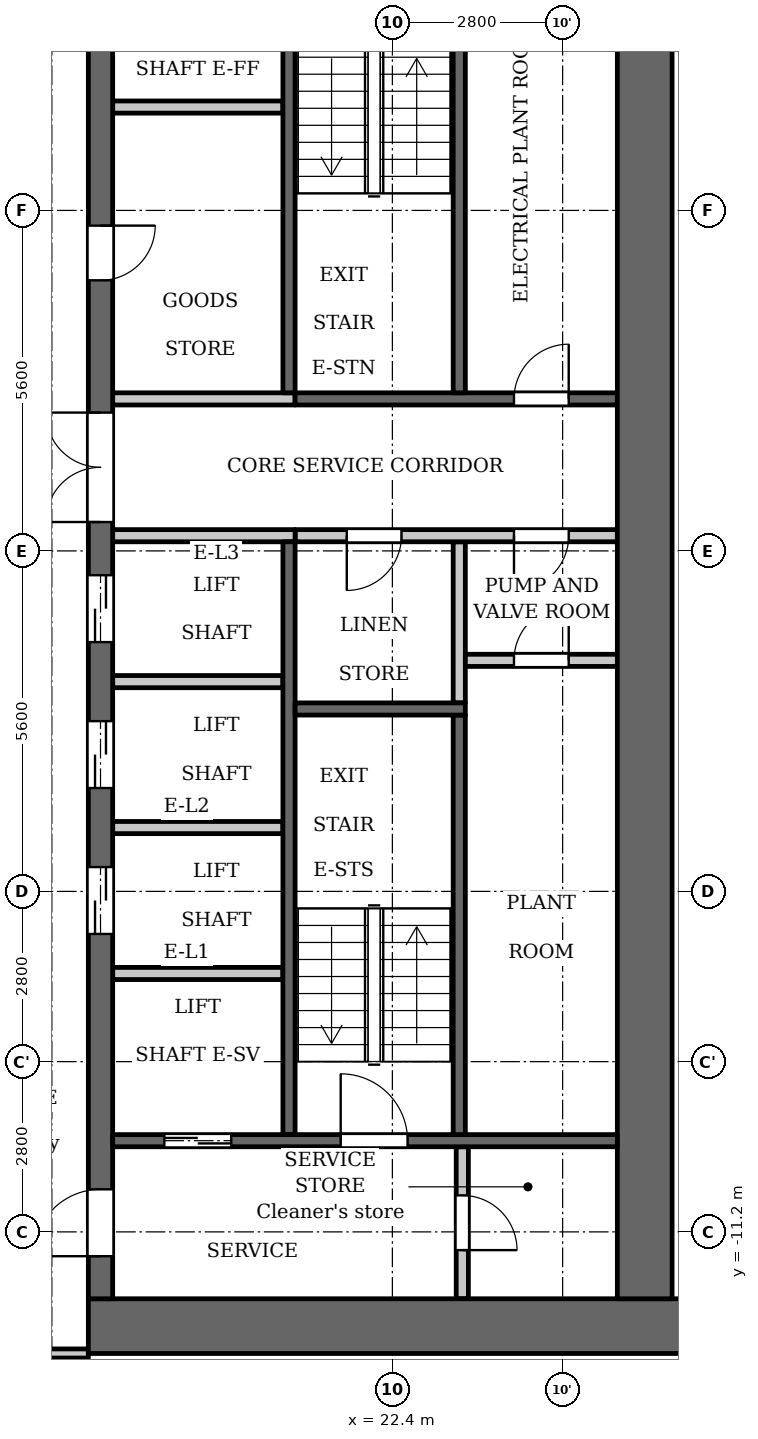
"""IFC4 building model, lengths in metres.
Left out: names, types, materials, properties, quantities, classifications, styles, units other than length and angle.
Written with IfcOpenShell. Run it as: python <this file> out.ifc"""

import sys

from ifc_helpers import new_model, si_unit, direction, frame, frame_2d, origin, place, context, subcontext, project, spatial, rectangle, extrude, element, fill, save


model = new_model("IFC4")
c1 = context("Model", 3, precision=1e-05, world=origin(), true_north=direction((0.0, 1.0)))
c2 = subcontext(c1, "Body", "Model", "MODEL_VIEW")
j1 = project(units=[si_unit("LENGTHUNIT", "METRE"), si_unit("PLANEANGLEUNIT", "RADIAN")], contexts=[c1])
p1 = place(None, origin())
s1 = spatial("IfcSite", under=j1, at=p1, CompositionType="ELEMENT")
p2 = place(p1, origin())
s2 = spatial("IfcBuilding", under=s1, at=p2, CompositionType="ELEMENT")
p3 = place(p2, frame((0.0, 0.0, 37.5)))
s3 = spatial("IfcBuildingStorey", under=s2, at=p3, CompositionType="ELEMENT", Elevation=37.5)
p4 = place(p3, frame((23.5, -2.5, 0.0), z_axis=(0.0, 0.0, 1.0), x_axis=(0.0, 1.0, 0.0)))
e1 = element("IfcWall", 1, at=p4, inside=s3, PredefinedType="PARTITIONING", context=c2, shape_type="SweptSolid", body=[
    extrude(rectangle(XDim=2.65, YDim=0.2, at=frame_2d((1.325, 0.0))), origin(), (0.0, 0.0, 1.0), 3.2),
])
p5 = place(p3, frame((20.7, 2.6, 0.0), z_axis=(0.0, 0.0, 1.0), x_axis=(0.0, 1.0, 0.0)))
e2 = element("IfcWall", 2, at=p5, inside=s3, PredefinedType="SHEAR", context=c2, shape_type="SweptSolid", body=[
    extrude(rectangle(XDim=7.0, YDim=0.2, at=frame_2d((3.5, 0.0))), origin(), (0.0, 0.0, 1.0), 3.2),
])
p6 = place(p3, frame((20.7, -9.6, 0.0), z_axis=(0.0, 0.0, 1.0), x_axis=(0.0, 1.0, 0.0)))
e3 = element("IfcWall", 3, at=p6, inside=s3, PredefinedType="SHEAR", context=c2, shape_type="SweptSolid", body=[
    extrude(rectangle(XDim=9.75, YDim=0.2, at=frame_2d((4.875, 0.0))), origin(), (0.0, 0.0, 1.0), 3.2),
])
p7 = place(p3, frame((20.8, 2.5, 0.0), z_axis=(0.0, 0.0, 1.0), x_axis=(1.0, 0.0, 0.0)))
e4 = element("IfcWall", 4, at=p7, inside=s3, PredefinedType="SHEAR", context=c2, shape_type="SweptSolid", body=[
    extrude(rectangle(XDim=5.3, YDim=0.2, at=frame_2d((2.65, 0.0))), origin(), (0.0, 0.0, 1.0), 3.2),
])
p8 = place(p7, frame((3.6, 0.0, 0.0)))
e5 = element("IfcOpeningElement", 5, at=p8, cuts=e4, PredefinedType="OPENING", context=c2, shape_type="SweptSolid", body=[
    extrude(rectangle(XDim=0.9, YDim=2.1, at=frame_2d((0.45, 1.05))), frame((0.0, 0.11, 0.0), z_axis=(0.0, -1.0, 0.0), x_axis=(1.0, 0.0, 0.0)), (0.0, 0.0, 1.0), 0.22),
])
p9 = place(p3, frame((20.8, 0.25, 0.0), z_axis=(0.0, 0.0, 1.0), x_axis=(1.0, 0.0, 0.0)))
e6 = element("IfcWall", 6, at=p9, inside=s3, PredefinedType="PARTITIONING", context=c2, shape_type="SweptSolid", body=[
    extrude(rectangle(XDim=5.3, YDim=0.2, at=frame_2d((2.65, 0.0))), origin(), (0.0, 0.0, 1.0), 3.2),
])
p10 = place(p9, frame((0.85, 0.0, 0.0)))
e7 = element("IfcOpeningElement", 7, at=p10, cuts=e6, PredefinedType="OPENING", context=c2, shape_type="SweptSolid", body=[
    extrude(rectangle(XDim=0.9, YDim=2.1, at=frame_2d((0.45, 1.05))), frame((0.0, 0.11, 0.0), z_axis=(0.0, -1.0, 0.0), x_axis=(1.0, 0.0, 0.0)), (0.0, 0.0, 1.0), 0.22),
])
p11 = place(p9, frame((3.6, 0.0, 0.0)))
e8 = element("IfcOpeningElement", 8, at=p11, cuts=e6, PredefinedType="OPENING", context=c2, shape_type="SweptSolid", body=[
    extrude(rectangle(XDim=0.9, YDim=2.1, at=frame_2d((0.45, 1.05))), frame((0.0, 0.11, 0.0), z_axis=(0.0, -1.0, 0.0), x_axis=(1.0, 0.0, 0.0)), (0.0, 0.0, 1.0), 0.22),
])
p12 = place(p3, frame((17.4, -12.75, 0.0), z_axis=(0.0, 0.0, 1.0), x_axis=(1.0, 0.0, 0.0)))
e9 = element("IfcWall", 9, at=p12, inside=s3, PredefinedType="SHEAR", context=c2, shape_type="SweptSolid", body=[
    extrude(rectangle(XDim=10.4, YDim=0.9, at=frame_2d((5.2, 0.0))), origin(), (0.0, 0.0, 1.0), 3.2),
])
p13 = place(p3, frame((17.6, -12.3, 0.0), z_axis=(0.0, 0.0, 1.0), x_axis=(0.0, 1.0, 0.0)))
e10 = element("IfcWall", 10, at=p13, inside=s3, PredefinedType="SHEAR", context=c2, shape_type="SweptSolid", body=[
    extrude(rectangle(XDim=24.6, YDim=0.4, at=frame_2d((12.3, 0.0))), origin(), (0.0, 0.0, 1.0), 3.2),
])
p14 = place(p13, frame((6.0, 0.0, 0.0)))
e11 = element("IfcOpeningElement", 11, at=p14, cuts=e10, PredefinedType="OPENING", context=c2, shape_type="SweptSolid", body=[
    extrude(rectangle(XDim=1.1, YDim=2.1, at=frame_2d((0.55, 1.05))), frame((0.0, 0.21, 0.0), z_axis=(0.0, -1.0, 0.0), x_axis=(1.0, 0.0, 0.0)), (0.0, 0.0, 1.0), 0.42),
])
p15 = place(p13, frame((8.4, 0.0, 0.0)))
e12 = element("IfcOpeningElement", 12, at=p15, cuts=e10, PredefinedType="OPENING", context=c2, shape_type="SweptSolid", body=[
    extrude(rectangle(XDim=1.1, YDim=2.1, at=frame_2d((0.55, 1.05))), frame((0.0, 0.21, 0.0), z_axis=(0.0, -1.0, 0.0), x_axis=(1.0, 0.0, 0.0)), (0.0, 0.0, 1.0), 0.42),
])
p16 = place(p13, frame((10.8, 0.0, 0.0)))
e13 = element("IfcOpeningElement", 13, at=p16, cuts=e10, PredefinedType="OPENING", context=c2, shape_type="SweptSolid", body=[
    extrude(rectangle(XDim=1.1, YDim=2.1, at=frame_2d((0.55, 1.05))), frame((0.0, 0.21, 0.0), z_axis=(0.0, -1.0, 0.0), x_axis=(1.0, 0.0, 0.0)), (0.0, 0.0, 1.0), 0.42),
])
p17 = place(p13, frame((16.75, 0.0, 0.0)))
e14 = element("IfcOpeningElement", 14, at=p17, cuts=e10, PredefinedType="OPENING", context=c2, shape_type="SweptSolid", body=[
    extrude(rectangle(XDim=0.9, YDim=2.1, at=frame_2d((0.45, 1.05))), frame((0.0, 0.21, 0.0), z_axis=(0.0, -1.0, 0.0), x_axis=(1.0, 0.0, 0.0)), (0.0, 0.0, 1.0), 0.42),
])
p18 = place(p13, frame((22.8, 0.0, 0.0)))
e15 = element("IfcOpeningElement", 15, at=p18, cuts=e10, PredefinedType="OPENING", context=c2, shape_type="SweptSolid", body=[
    extrude(rectangle(XDim=1.1, YDim=2.1, at=frame_2d((0.55, 1.05))), frame((0.0, 0.21, 0.0), z_axis=(0.0, -1.0, 0.0), x_axis=(1.0, 0.0, 0.0)), (0.0, 0.0, 1.0), 0.42),
])
p19 = place(p13, frame((0.7, 0.0, 0.0)))
e16 = element("IfcOpeningElement", 16, at=p19, cuts=e10, PredefinedType="OPENING", context=c2, shape_type="SweptSolid", body=[
    extrude(rectangle(XDim=1.1, YDim=2.1, at=frame_2d((0.55, 1.05))), frame((0.0, 0.21, 0.0), z_axis=(0.0, -1.0, 0.0), x_axis=(1.0, 0.0, 0.0)), (0.0, 0.0, 1.0), 0.42),
])
p20 = place(p13, frame((12.775, 0.0, 0.0)))
e17 = element("IfcOpeningElement", 17, at=p20, cuts=e10, PredefinedType="OPENING", context=c2, shape_type="SweptSolid", body=[
    extrude(rectangle(XDim=1.8, YDim=2.1, at=frame_2d((0.9, 1.05))), frame((0.0, 0.21, 0.0), z_axis=(0.0, -1.0, 0.0), x_axis=(1.0, 0.0, 0.0)), (0.0, 0.0, 1.0), 0.42),
])
p21 = place(p3, frame((26.55, -12.3, 0.0), z_axis=(0.0, 0.0, 1.0), x_axis=(0.0, 1.0, 0.0)))
e18 = element("IfcWall", 18, at=p21, inside=s3, PredefinedType="SHEAR", context=c2, shape_type="SweptSolid", body=[
    extrude(rectangle(XDim=24.6, YDim=0.9, at=frame_2d((12.3, 0.0))), origin(), (0.0, 0.0, 1.0), 3.2),
])
p22 = place(p3, frame((23.55, -12.3, 0.0), z_axis=(0.0, 0.0, 1.0), x_axis=(0.0, 1.0, 0.0)))
e19 = element("IfcWall", 19, at=p22, inside=s3, PredefinedType="PARTITIONING", context=c2, shape_type="SweptSolid", body=[
    extrude(rectangle(XDim=2.5, YDim=0.2, at=frame_2d((1.25, 0.0))), origin(), (0.0, 0.0, 1.0), 3.2),
])
p23 = place(p22, frame((0.8, 0.0, 0.0)))
e20 = element("IfcOpeningElement", 20, at=p23, cuts=e19, PredefinedType="OPENING", context=c2, shape_type="SweptSolid", body=[
    extrude(rectangle(XDim=0.9, YDim=2.1, at=frame_2d((0.45, 1.05))), frame((0.0, 0.11, 0.0), z_axis=(0.0, -1.0, 0.0), x_axis=(1.0, 0.0, 0.0)), (0.0, 0.0, 1.0), 0.22),
])
p24 = place(p3, frame((23.6, -1.8, 0.0), z_axis=(0.0, 0.0, 1.0), x_axis=(1.0, 0.0, 0.0)))
e21 = element("IfcWall", 21, at=p24, inside=s3, PredefinedType="PARTITIONING", context=c2, shape_type="SweptSolid", body=[
    extrude(rectangle(XDim=2.5, YDim=0.2, at=frame_2d((1.25, 0.0))), origin(), (0.0, 0.0, 1.0), 3.2),
])
p25 = place(p24, frame((0.8, 0.0, 0.0)))
e22 = element("IfcOpeningElement", 22, at=p25, cuts=e21, PredefinedType="OPENING", context=c2, shape_type="SweptSolid", body=[
    extrude(rectangle(XDim=0.9, YDim=2.1, at=frame_2d((0.45, 1.05))), frame((0.0, 0.11, 0.0), z_axis=(0.0, -1.0, 0.0), x_axis=(1.0, 0.0, 0.0)), (0.0, 0.0, 1.0), 0.22),
])
p26 = place(p3, frame((17.8, -9.7, 0.0), z_axis=(0.0, 0.0, 1.0), x_axis=(1.0, 0.0, 0.0)))
e23 = element("IfcWall", 23, at=p26, inside=s3, PredefinedType="SHEAR", context=c2, shape_type="SweptSolid", body=[
    extrude(rectangle(XDim=8.3, YDim=0.2, at=frame_2d((4.15, 0.0))), origin(), (0.0, 0.0, 1.0), 3.2),
])
p27 = place(p26, frame((0.85, 0.0, 0.0)))
e24 = element("IfcOpeningElement", 24, at=p27, cuts=e23, PredefinedType="OPENING", context=c2, shape_type="SweptSolid", body=[
    extrude(rectangle(XDim=1.1, YDim=2.1, at=frame_2d((0.55, 1.05))), frame((0.0, 0.11, 0.0), z_axis=(0.0, -1.0, 0.0), x_axis=(1.0, 0.0, 0.0)), (0.0, 0.0, 1.0), 0.22),
])
p28 = place(p26, frame((3.75, 0.0, 0.0)))
e25 = element("IfcOpeningElement", 25, at=p28, cuts=e23, PredefinedType="OPENING", context=c2, shape_type="SweptSolid", body=[
    extrude(rectangle(XDim=1.1, YDim=2.1, at=frame_2d((0.55, 1.05))), frame((0.0, 0.11, 0.0), z_axis=(0.0, -1.0, 0.0), x_axis=(1.0, 0.0, 0.0)), (0.0, 0.0, 1.0), 0.22),
])
for number, where, z_axis, x_axis in (
    (26, (17.8, -6.95, 0.0), (0.0, 0.0, 1.0), (1.0, 0.0, 0.0)),
    (27, (17.8, -4.55, 0.0), (0.0, 0.0, 1.0), (1.0, 0.0, 0.0)),
    (28, (17.8, -2.15, 0.0), (0.0, 0.0, 1.0), (1.0, 0.0, 0.0)),
):
    element("IfcWall", number, at=place(p3, frame(where, z_axis=z_axis, x_axis=x_axis)), inside=s3, PredefinedType="PARTITIONING", context=c2, shape_type="SweptSolid", body=[
        extrude(rectangle(XDim=2.8, YDim=0.2, at=frame_2d((1.4, 0.0))), origin(), (0.0, 0.0, 1.0), 3.2),
    ])
for number, where, z_axis, x_axis in (
    (29, (17.8, 0.25, 0.0), (0.0, 0.0, 1.0), (1.0, 0.0, 0.0)),
    (30, (17.8, 2.5, 0.0), (0.0, 0.0, 1.0), (1.0, 0.0, 0.0)),
):
    element("IfcWall", number, at=place(p3, frame(where, z_axis=z_axis, x_axis=x_axis)), inside=s3, PredefinedType="PARTITIONING", context=c2, shape_type="SweptSolid", body=[
        extrude(rectangle(XDim=3.0, YDim=0.2, at=frame_2d((1.5, 0.0))), origin(), (0.0, 0.0, 1.0), 3.2),
    ])
p29 = place(p3, frame((17.8, 7.3, 0.0), z_axis=(0.0, 0.0, 1.0), x_axis=(1.0, 0.0, 0.0)))
e31 = element("IfcWall", 31, at=p29, inside=s3, PredefinedType="PARTITIONING", context=c2, shape_type="SweptSolid", body=[
    extrude(rectangle(XDim=2.8, YDim=0.2, at=frame_2d((1.4, 0.0))), origin(), (0.0, 0.0, 1.0), 3.2),
])
p30 = place(p3, frame((23.5, 2.6, 0.0), z_axis=(0.0, 0.0, 1.0), x_axis=(0.0, 1.0, 0.0)))
e32 = element("IfcWall", 32, at=p30, inside=s3, PredefinedType="SHEAR", context=c2, shape_type="SweptSolid", body=[
    extrude(rectangle(XDim=7.0, YDim=0.2, at=frame_2d((3.5, 0.0))), origin(), (0.0, 0.0, 1.0), 3.2),
])
p31 = place(p3, frame((23.5, -9.6, 0.0), z_axis=(0.0, 0.0, 1.0), x_axis=(0.0, 1.0, 0.0)))
e33 = element("IfcWall", 33, at=p31, inside=s3, PredefinedType="SHEAR", context=c2, shape_type="SweptSolid", body=[
    extrude(rectangle(XDim=6.9, YDim=0.2, at=frame_2d((3.45, 0.0))), origin(), (0.0, 0.0, 1.0), 3.2),
])
p32 = place(p3, frame((20.8, -2.6, 0.0), z_axis=(0.0, 0.0, 1.0), x_axis=(1.0, 0.0, 0.0)))
e34 = element("IfcWall", 34, at=p32, inside=s3, PredefinedType="SHEAR", context=c2, shape_type="SweptSolid", body=[
    extrude(rectangle(XDim=2.8, YDim=0.2, at=frame_2d((1.4, 0.0))), origin(), (0.0, 0.0, 1.0), 3.2),
])
p33 = place(p3, frame((-17.4, -13.2, 0.0), z_axis=(0.0, 0.0, 1.0), x_axis=(1.0, 0.0, 0.0)))
e35 = element("IfcWall", 35, at=p33, inside=s3, PredefinedType="PARTITIONING", context=c2, shape_type="SweptSolid", body=[
    extrude(rectangle(XDim=34.8, YDim=0.15, at=frame_2d((17.4, 0.0))), origin(), (0.0, 0.0, 1.0), 3.2),
])
p34 = place(p33, frame((0.65, 0.0, 0.0)))
e36 = element("IfcOpeningElement", 36, at=p34, cuts=e35, PredefinedType="OPENING", context=c2, shape_type="SweptSolid", body=[
    extrude(rectangle(XDim=1.0, YDim=2.1, at=frame_2d((0.5, 1.05))), frame((0.0, 0.085, 0.0), z_axis=(0.0, -1.0, 0.0), x_axis=(1.0, 0.0, 0.0)), (0.0, 0.0, 1.0), 0.17),
])
p35 = place(p33, frame((33.05, 0.0, 0.0)))
e37 = element("IfcOpeningElement", 37, at=p35, cuts=e35, PredefinedType="OPENING", context=c2, shape_type="SweptSolid", body=[
    extrude(rectangle(XDim=1.0, YDim=2.1, at=frame_2d((0.5, 1.05))), frame((0.0, 0.085, 0.0), z_axis=(0.0, -1.0, 0.0), x_axis=(1.0, 0.0, 0.0)), (0.0, 0.0, 1.0), 0.17),
])
p36 = place(p33, frame((4.55, 0.0, 0.0)))
e38 = element("IfcOpeningElement", 38, at=p36, cuts=e35, PredefinedType="OPENING", context=c2, shape_type="SweptSolid", body=[
    extrude(rectangle(XDim=1.0, YDim=2.1, at=frame_2d((0.5, 1.05))), frame((0.0, 0.085, 0.0), z_axis=(0.0, -1.0, 0.0), x_axis=(1.0, 0.0, 0.0)), (0.0, 0.0, 1.0), 0.17),
])
p37 = place(p33, frame((6.9, 0.0, 0.0)))
e39 = element("IfcOpeningElement", 39, at=p37, cuts=e35, PredefinedType="OPENING", context=c2, shape_type="SweptSolid", body=[
    extrude(rectangle(XDim=1.0, YDim=2.1, at=frame_2d((0.5, 1.05))), frame((0.0, 0.085, 0.0), z_axis=(0.0, -1.0, 0.0), x_axis=(1.0, 0.0, 0.0)), (0.0, 0.0, 1.0), 0.17),
])
p38 = place(p33, frame((15.75, 0.0, 0.0)))
e40 = element("IfcOpeningElement", 40, at=p38, cuts=e35, PredefinedType="OPENING", context=c2, shape_type="SweptSolid", body=[
    extrude(rectangle(XDim=1.0, YDim=2.1, at=frame_2d((0.5, 1.05))), frame((0.0, 0.085, 0.0), z_axis=(0.0, -1.0, 0.0), x_axis=(1.0, 0.0, 0.0)), (0.0, 0.0, 1.0), 0.17),
])
p39 = place(p33, frame((18.1, 0.0, 0.0)))
e41 = element("IfcOpeningElement", 41, at=p39, cuts=e35, PredefinedType="OPENING", context=c2, shape_type="SweptSolid", body=[
    extrude(rectangle(XDim=1.0, YDim=2.1, at=frame_2d((0.5, 1.05))), frame((0.0, 0.085, 0.0), z_axis=(0.0, -1.0, 0.0), x_axis=(1.0, 0.0, 0.0)), (0.0, 0.0, 1.0), 0.17),
])
p40 = place(p33, frame((26.95, 0.0, 0.0)))
e42 = element("IfcOpeningElement", 42, at=p40, cuts=e35, PredefinedType="OPENING", context=c2, shape_type="SweptSolid", body=[
    extrude(rectangle(XDim=1.0, YDim=2.1, at=frame_2d((0.5, 1.05))), frame((0.0, 0.085, 0.0), z_axis=(0.0, -1.0, 0.0), x_axis=(1.0, 0.0, 0.0)), (0.0, 0.0, 1.0), 0.17),
])
p41 = place(p33, frame((29.25, 0.0, 0.0)))
e43 = element("IfcOpeningElement", 43, at=p41, cuts=e35, PredefinedType="OPENING", context=c2, shape_type="SweptSolid", body=[
    extrude(rectangle(XDim=1.0, YDim=2.1, at=frame_2d((0.5, 1.05))), frame((0.0, 0.085, 0.0), z_axis=(0.0, -1.0, 0.0), x_axis=(1.0, 0.0, 0.0)), (0.0, 0.0, 1.0), 0.17),
])
p42 = place(p27, origin())
e44 = element("IfcDoor", 44, at=p42, inside=s3, OperationType="DOUBLE_DOOR_SLIDING", PredefinedType="DOOR", context=c2, shape_type="SweptSolid", body=[
    extrude(rectangle(XDim=1.1, YDim=2.1, at=frame_2d((0.55, 1.05))), frame((0.0, 0.025, 0.0), z_axis=(0.0, -1.0, 0.0), x_axis=(1.0, 0.0, 0.0)), (0.0, 0.0, 1.0), 0.05),
])
fill(e24, e44)
p43 = place(p14, origin())
e45 = element("IfcDoor", 45, at=p43, inside=s3, OperationType="DOUBLE_DOOR_SLIDING", PredefinedType="DOOR", context=c2, shape_type="SweptSolid", body=[
    extrude(rectangle(XDim=1.1, YDim=2.1, at=frame_2d((0.55, 1.05))), frame((0.0, 0.025, 0.0), z_axis=(0.0, -1.0, 0.0), x_axis=(1.0, 0.0, 0.0)), (0.0, 0.0, 1.0), 0.05),
])
fill(e11, e45)
p44 = place(p15, origin())
e46 = element("IfcDoor", 46, at=p44, inside=s3, OperationType="DOUBLE_DOOR_SLIDING", PredefinedType="DOOR", context=c2, shape_type="SweptSolid", body=[
    extrude(rectangle(XDim=1.1, YDim=2.1, at=frame_2d((0.55, 1.05))), frame((0.0, 0.025, 0.0), z_axis=(0.0, -1.0, 0.0), x_axis=(1.0, 0.0, 0.0)), (0.0, 0.0, 1.0), 0.05),
])
fill(e12, e46)
p45 = place(p16, origin())
e47 = element("IfcDoor", 47, at=p45, inside=s3, OperationType="DOUBLE_DOOR_SLIDING", PredefinedType="DOOR", context=c2, shape_type="SweptSolid", body=[
    extrude(rectangle(XDim=1.1, YDim=2.1, at=frame_2d((0.55, 1.05))), frame((0.0, 0.025, 0.0), z_axis=(0.0, -1.0, 0.0), x_axis=(1.0, 0.0, 0.0)), (0.0, 0.0, 1.0), 0.05),
])
fill(e13, e47)
p46 = place(p17, origin())
e48 = element("IfcDoor", 48, at=p46, inside=s3, OperationType="SINGLE_SWING_RIGHT", PredefinedType="DOOR", context=c2, shape_type="SweptSolid", body=[
    extrude(rectangle(XDim=0.9, YDim=2.1, at=frame_2d((0.45, 1.05))), frame((0.0, 0.025, 0.0), z_axis=(0.0, -1.0, 0.0), x_axis=(1.0, 0.0, 0.0)), (0.0, 0.0, 1.0), 0.05),
])
fill(e14, e48)
p47 = place(p19, origin())
e49 = element("IfcDoor", 49, at=p47, inside=s3, OperationType="SINGLE_SWING_RIGHT", PredefinedType="DOOR", context=c2, shape_type="SweptSolid", body=[
    extrude(rectangle(XDim=1.1, YDim=2.1, at=frame_2d((0.55, 1.05))), frame((0.0, 0.025, 0.0), z_axis=(0.0, -1.0, 0.0), x_axis=(1.0, 0.0, 0.0)), (0.0, 0.0, 1.0), 0.05),
])
fill(e16, e49)
p48 = place(p23, origin())
e50 = element("IfcDoor", 50, at=p48, inside=s3, OperationType="SINGLE_SWING_LEFT", PredefinedType="DOOR", context=c2, shape_type="SweptSolid", body=[
    extrude(rectangle(XDim=0.9, YDim=2.1, at=frame_2d((0.45, 1.05))), frame((0.0, 0.025, 0.0), z_axis=(0.0, -1.0, 0.0), x_axis=(1.0, 0.0, 0.0)), (0.0, 0.0, 1.0), 0.05),
])
fill(e20, e50)
p49 = place(p28, origin())
e51 = element("IfcDoor", 51, at=p49, inside=s3, OperationType="SINGLE_SWING_RIGHT", PredefinedType="DOOR", context=c2, shape_type="SweptSolid", body=[
    extrude(rectangle(XDim=1.1, YDim=2.1, at=frame_2d((0.55, 1.05))), frame((0.0, 0.025, 0.0), z_axis=(0.0, -1.0, 0.0), x_axis=(1.0, 0.0, 0.0)), (0.0, 0.0, 1.0), 0.05),
])
fill(e25, e51)
p50 = place(p20, origin())
e52 = element("IfcDoor", 52, at=p50, inside=s3, OperationType="DOUBLE_DOOR_SINGLE_SWING", PredefinedType="DOOR", context=c2, shape_type="SweptSolid", body=[
    extrude(rectangle(XDim=1.8, YDim=2.1, at=frame_2d((0.9, 1.05))), frame((0.0, 0.025, 0.0), z_axis=(0.0, -1.0, 0.0), x_axis=(1.0, 0.0, 0.0)), (0.0, 0.0, 1.0), 0.05),
])
fill(e17, e52)
p51 = place(p10, origin())
e53 = element("IfcDoor", 53, at=p51, inside=s3, OperationType="SINGLE_SWING_LEFT", PredefinedType="DOOR", context=c2, shape_type="SweptSolid", body=[
    extrude(rectangle(XDim=0.9, YDim=2.1, at=frame_2d((0.45, 1.05))), frame((0.0, 0.025, 0.0), z_axis=(0.0, -1.0, 0.0), x_axis=(1.0, 0.0, 0.0)), (0.0, 0.0, 1.0), 0.05),
])
fill(e7, e53)
p52 = place(p25, origin())
e54 = element("IfcDoor", 54, at=p52, inside=s3, OperationType="SINGLE_SWING_LEFT", PredefinedType="DOOR", context=c2, shape_type="SweptSolid", body=[
    extrude(rectangle(XDim=0.9, YDim=2.1, at=frame_2d((0.45, 1.05))), frame((0.0, 0.025, 0.0), z_axis=(0.0, -1.0, 0.0), x_axis=(1.0, 0.0, 0.0)), (0.0, 0.0, 1.0), 0.05),
])
fill(e22, e54)
p53 = place(p11, origin())
e55 = element("IfcDoor", 55, at=p53, inside=s3, OperationType="SINGLE_SWING_LEFT", PredefinedType="DOOR", context=c2, shape_type="SweptSolid", body=[
    extrude(rectangle(XDim=0.9, YDim=2.1, at=frame_2d((0.45, 1.05))), frame((0.0, 0.025, 0.0), z_axis=(0.0, -1.0, 0.0), x_axis=(1.0, 0.0, 0.0)), (0.0, 0.0, 1.0), 0.05),
])
fill(e8, e55)
p54 = place(p8, origin())
e56 = element("IfcDoor", 56, at=p54, inside=s3, OperationType="SINGLE_SWING_LEFT", PredefinedType="DOOR", context=c2, shape_type="SweptSolid", body=[
    extrude(rectangle(XDim=0.9, YDim=2.1, at=frame_2d((0.45, 1.05))), frame((0.0, 0.025, 0.0), z_axis=(0.0, -1.0, 0.0), x_axis=(1.0, 0.0, 0.0)), (0.0, 0.0, 1.0), 0.05),
])
fill(e5, e56)
save(model, sys.argv[1])
